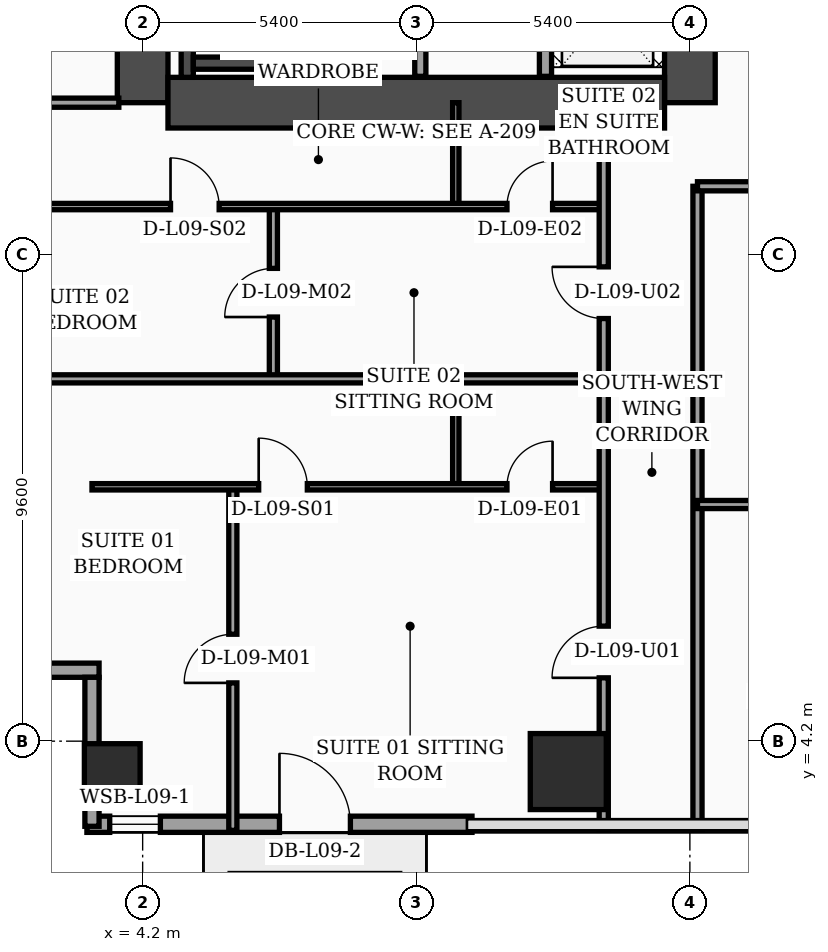
"""IFC4 building model, lengths in metres.
Left out: names, types, materials, properties, quantities, classifications, styles, units other than length and angle.
Written with IfcOpenShell. Run it as: python <this file> out.ifc"""

import sys

from ifc_helpers import new_model, si_unit, direction, frame, frame_2d, origin, origin_2d, place, context, subcontext, project, spatial, rectangle, hollow_rectangle, extrude, element, fill, save


model = new_model("IFC4")
c1 = context("Model", 3, precision=1e-05, world=origin(), true_north=direction((0.0, 1.0)))
c2 = subcontext(c1, "Body", "Model", "MODEL_VIEW")
j1 = project(units=[si_unit("LENGTHUNIT", "METRE"), si_unit("PLANEANGLEUNIT", "RADIAN")], contexts=[c1])
p1 = place(None, origin())
s1 = spatial("IfcSite", under=j1, at=p1, CompositionType="ELEMENT")
p2 = place(p1, origin())
s2 = spatial("IfcBuilding", under=s1, at=p2, CompositionType="ELEMENT")
p3 = place(p2, frame((0.0, 0.0, 42.2)))
s3 = spatial("IfcBuildingStorey", under=s2, at=p3, CompositionType="ELEMENT", Elevation=42.2)
p4 = place(p3, frame((4.2, 16.8, 0.0), z_axis=(0.0, 0.0, 1.0), x_axis=(0.0, 1.0, 0.0)))
e1 = element("IfcWall", 1, at=p4, inside=s3, PredefinedType="SHEAR", context=c2, shape_type="SweptSolid", body=[
    extrude(rectangle(XDim=21.6, YDim=1.0, at=frame_2d((10.8, 0.0))), origin(), (0.0, 0.0, 1.0), 3.52),
])
p5 = place(p3, frame((15.0, 16.8, 0.0), z_axis=(0.0, 0.0, 1.0), x_axis=(0.0, 1.0, 0.0)))
e2 = element("IfcWall", 2, at=p5, inside=s3, PredefinedType="SHEAR", context=c2, shape_type="SweptSolid", body=[
    extrude(rectangle(XDim=21.6, YDim=1.0, at=frame_2d((10.8, 0.0))), origin(), (0.0, 0.0, 1.0), 3.52),
])
p6 = place(p5, frame((8.65, 0.0, 0.0)))
e3 = element("IfcOpeningElement", 3, at=p6, cuts=e2, PredefinedType="OPENING", context=c2, shape_type="SweptSolid", body=[
    extrude(rectangle(XDim=1.1, YDim=2.2, at=frame_2d((0.55, 1.1))), frame((0.0, 0.51, 0.0), z_axis=(0.0, -1.0, 0.0), x_axis=(1.0, 0.0, 0.0)), (0.0, 0.0, 1.0), 1.02),
])
p7 = place(p5, frame((1.25, 0.0, 0.0)))
e4 = element("IfcOpeningElement", 4, at=p7, cuts=e2, PredefinedType="OPENING", context=c2, shape_type="SweptSolid", body=[
    extrude(rectangle(XDim=1.1, YDim=2.2, at=frame_2d((0.55, 1.1))), frame((0.0, 0.51, 0.0), z_axis=(0.0, -1.0, 0.0), x_axis=(1.0, 0.0, 0.0)), (0.0, 0.0, 1.0), 1.02),
])
p8 = place(p5, frame((3.8, 0.0, 0.0)))
e5 = element("IfcOpeningElement", 5, at=p8, cuts=e2, PredefinedType="OPENING", context=c2, shape_type="SweptSolid", body=[
    extrude(rectangle(XDim=1.1, YDim=2.2, at=frame_2d((0.55, 1.1))), frame((0.0, 0.51, 0.0), z_axis=(0.0, -1.0, 0.0), x_axis=(1.0, 0.0, 0.0)), (0.0, 0.0, 1.0), 1.02),
])
p9 = place(p5, frame((6.35, 0.0, 0.0)))
e6 = element("IfcOpeningElement", 6, at=p9, cuts=e2, PredefinedType="OPENING", context=c2, shape_type="SweptSolid", body=[
    extrude(rectangle(XDim=1.1, YDim=2.2, at=frame_2d((0.55, 1.1))), frame((0.0, 0.51, 0.0), z_axis=(0.0, -1.0, 0.0), x_axis=(1.0, 0.0, 0.0)), (0.0, 0.0, 1.0), 1.02),
])
p10 = place(p3, frame((4.7, 16.8, 0.0), z_axis=(0.0, 0.0, 1.0), x_axis=(1.0, 0.0, 0.0)))
e7 = element("IfcWall", 7, at=p10, inside=s3, PredefinedType="SHEAR", context=c2, shape_type="SweptSolid", body=[
    extrude(rectangle(XDim=9.8, YDim=1.0, at=frame_2d((4.9, 0.0))), origin(), (0.0, 0.0, 1.0), 3.52),
])
p11 = place(p3, frame((5.08, 17.3, 0.0), z_axis=(0.0, 0.0, 1.0), x_axis=(0.0, 1.0, 0.0)))
e8 = element("IfcWall", 8, at=p11, inside=s3, PredefinedType="SOLIDWALL", context=c2, shape_type="SweptSolid", body=[
    extrude(rectangle(XDim=9.49, YDim=0.24, at=frame_2d((4.745, 0.0))), origin(), (0.0, 0.0, 1.0), 3.52),
])
p12 = place(p3, frame((8.42, 17.3, 0.0), z_axis=(0.0, 0.0, 1.0), x_axis=(0.0, 1.0, 0.0)))
e9 = element("IfcWall", 9, at=p12, inside=s3, PredefinedType="SOLIDWALL", context=c2, shape_type="SweptSolid", body=[
    extrude(rectangle(XDim=9.49, YDim=0.24, at=frame_2d((4.745, 0.0))), origin(), (0.0, 0.0, 1.0), 3.52),
])
p13 = place(p12, frame((0.35, 0.0, 0.0)))
e10 = element("IfcOpeningElement", 10, at=p13, cuts=e9, PredefinedType="OPENING", context=c2, shape_type="SweptSolid", body=[
    extrude(rectangle(XDim=1.15, YDim=2.2, at=frame_2d((0.575, 1.1))), frame((0.0, 0.13, 0.0), z_axis=(0.0, -1.0, 0.0), x_axis=(1.0, 0.0, 0.0)), (0.0, 0.0, 1.0), 0.26),
])
p14 = place(p3, frame((5.2, 17.58, 0.0), z_axis=(0.0, 0.0, 1.0), x_axis=(1.0, 0.0, 0.0)))
e11 = element("IfcWall", 11, at=p14, inside=s3, PredefinedType="SOLIDWALL", context=c2, shape_type="SweptSolid", body=[
    extrude(rectangle(XDim=3.1, YDim=0.24, at=frame_2d((1.55, 0.0))), origin(), (0.0, 0.0, 1.0), 3.52),
])
p15 = place(p3, frame((3.6, 3.6, 0.0), z_axis=(0.0, 0.0, 1.0), x_axis=(1.0, 0.0, 0.0)))
e12 = element("IfcColumn", 12, at=p15, inside=s3, PredefinedType="COLUMN", context=c2, shape_type="SweptSolid", body=[
    extrude(hollow_rectangle(XDim=1.1, YDim=1.1, WallThickness=0.045, at=origin_2d()), origin(), (0.0, 0.0, 1.0), 3.52),
])
p16 = place(p3, frame((12.6, 3.6, 0.0), z_axis=(0.0, 0.0, 1.0), x_axis=(1.0, 0.0, 0.0)))
e13 = element("IfcColumn", 13, at=p16, inside=s3, PredefinedType="COLUMN", context=c2, shape_type="SweptSolid", body=[
    extrude(rectangle(XDim=1.5, YDim=1.5, at=origin_2d()), origin(), (0.0, 0.0, 1.0), 3.52),
])
p17 = place(p3, frame((3.1, 2.56, 0.0), z_axis=(0.0, 0.0, 1.0), x_axis=(1.0, 0.0, 0.0)))
e14 = element("IfcWall", 14, at=p17, inside=s3, PredefinedType="SOLIDWALL", context=c2, shape_type="SweptSolid", body=[
    extrude(rectangle(XDim=7.6, YDim=0.32, at=frame_2d((3.8, 0.0))), origin(), (0.0, 0.0, 1.0), 3.52),
])
p18 = place(p17, frame((0.45, 0.0, 0.75)))
e15 = element("IfcOpeningElement", 15, at=p18, cuts=e14, PredefinedType="OPENING", context=c2, shape_type="SweptSolid", body=[
    extrude(rectangle(XDim=1.0, YDim=1.6, at=frame_2d((0.5, 0.8))), frame((0.0, 0.17, 0.0), z_axis=(0.0, -1.0, 0.0), x_axis=(1.0, 0.0, 0.0)), (0.0, 0.0, 1.0), 0.34),
])
p19 = place(p17, frame((3.8, 0.0, 0.0)))
e16 = element("IfcOpeningElement", 16, at=p19, cuts=e14, PredefinedType="OPENING", context=c2, shape_type="SweptSolid", body=[
    extrude(rectangle(XDim=1.4, YDim=2.25, at=frame_2d((0.7, 1.125))), frame((0.0, 0.17, 0.0), z_axis=(0.0, -1.0, 0.0), x_axis=(1.0, 0.0, 0.0)), (0.0, 0.0, 1.0), 0.34),
])
p20 = place(p3, frame((0.12, 5.6, 0.0), z_axis=(0.0, 0.0, 1.0), x_axis=(1.0, 0.0, 0.0)))
e17 = element("IfcWall", 17, at=p20, inside=s3, PredefinedType="SOLIDWALL", context=c2, shape_type="SweptSolid", body=[
    extrude(rectangle(XDim=3.22, YDim=0.28, at=frame_2d((1.61, 0.0))), origin(), (0.0, 0.0, 1.0), 2.82),
])
p21 = place(p3, frame((3.2, 5.46, 0.0), z_axis=(0.0, 0.0, 1.0), x_axis=(0.0, -1.0, 0.0)))
e18 = element("IfcWall", 18, at=p21, inside=s3, PredefinedType="SOLIDWALL", context=c2, shape_type="SweptSolid", body=[
    extrude(rectangle(XDim=2.94, YDim=0.28, at=frame_2d((1.47, 0.0))), origin(), (0.0, 0.0, 1.0), 2.82),
])
p22 = place(p3, frame((9.68, 17.32, 0.0), z_axis=(0.0, 0.0, 1.0), x_axis=(0.0, 1.0, 0.0)))
e19 = element("IfcWall", 19, at=p22, inside=s3, PredefinedType="SOLIDWALL", context=c2, shape_type="SweptSolid", body=[
    extrude(rectangle(XDim=7.68, YDim=0.22, at=frame_2d((3.84, 0.0))), origin(), (0.0, 0.0, 1.0), 3.52),
])
p23 = place(p3, frame((12.15, 17.32, 0.0), z_axis=(0.0, 0.0, 1.0), x_axis=(0.0, 1.0, 0.0)))
e20 = element("IfcWall", 20, at=p23, inside=s3, PredefinedType="SOLIDWALL", context=c2, shape_type="SweptSolid", body=[
    extrude(rectangle(XDim=7.65, YDim=0.24, at=frame_2d((3.825, 0.0))), origin(), (0.0, 0.0, 1.0), 3.52),
])
p24 = place(p3, frame((0.08, 16.8, 0.0), z_axis=(0.0, 0.0, 1.0), x_axis=(1.0, 0.0, 0.0)))
e21 = element("IfcWall", 21, at=p24, inside=s3, PredefinedType="PARTITIONING", context=c2, shape_type="SweptSolid", body=[
    extrude(rectangle(XDim=3.65, YDim=0.18, at=frame_2d((1.825, 0.0))), origin(), (0.0, 0.0, 1.0), 2.82),
])
p25 = place(p3, frame((10.38, 9.22, 0.0), z_axis=(0.0, 0.0, 1.0), x_axis=(0.0, 1.0, 0.0)))
e22 = element("IfcWall", 22, at=p25, inside=s3, PredefinedType="PARTITIONING", context=c2, shape_type="SweptSolid", body=[
    extrude(rectangle(XDim=2.13, YDim=0.125, at=frame_2d((1.065, 0.0))), origin(), (0.0, 0.0, 1.0), 3.12),
])
p26 = place(p3, frame((5.98, 2.44, 0.0), z_axis=(0.0, 0.0, 1.0), x_axis=(0.0, 1.0, 0.0)))
e23 = element("IfcWall", 23, at=p26, inside=s3, PredefinedType="PARTITIONING", context=c2, shape_type="SweptSolid", body=[
    extrude(rectangle(XDim=6.78, YDim=0.16, at=frame_2d((3.39, 0.0))), origin(), (0.0, 0.0, 1.0), 3.02),
])
p27 = place(p26, frame((2.91, 0.0, 0.0)))
e24 = element("IfcOpeningElement", 24, at=p27, cuts=e23, PredefinedType="OPENING", context=c2, shape_type="SweptSolid", body=[
    extrude(rectangle(XDim=0.96, YDim=2.2, at=frame_2d((0.48, 1.1))), frame((0.0, 0.09, 0.0), z_axis=(0.0, -1.0, 0.0), x_axis=(1.0, 0.0, 0.0)), (0.0, 0.0, 1.0), 0.18),
])
p28 = place(p3, frame((3.2, 9.22, 0.0), z_axis=(0.0, 0.0, 1.0), x_axis=(1.0, 0.0, 0.0)))
e25 = element("IfcWall", 25, at=p28, inside=s3, PredefinedType="PARTITIONING", context=c2, shape_type="SweptSolid", body=[
    extrude(rectangle(XDim=10.1, YDim=0.125, at=frame_2d((5.05, 0.0))), origin(), (0.0, 0.0, 1.0), 2.82),
])
p29 = place(p28, frame((3.29, 0.0, 0.0)))
e26 = element("IfcOpeningElement", 26, at=p29, cuts=e25, PredefinedType="OPENING", context=c2, shape_type="SweptSolid", body=[
    extrude(rectangle(XDim=0.96, YDim=2.2, at=frame_2d((0.48, 1.1))), frame((0.0, 0.073, 0.0), z_axis=(0.0, -1.0, 0.0), x_axis=(1.0, 0.0, 0.0)), (0.0, 0.0, 1.0), 0.145),
])
p30 = place(p28, frame((8.19, 0.0, 0.0)))
e27 = element("IfcOpeningElement", 27, at=p30, cuts=e25, PredefinedType="OPENING", context=c2, shape_type="SweptSolid", body=[
    extrude(rectangle(XDim=0.9, YDim=2.15, at=frame_2d((0.45, 1.075))), frame((0.0, 0.073, 0.0), z_axis=(0.0, -1.0, 0.0), x_axis=(1.0, 0.0, 0.0)), (0.0, 0.0, 1.0), 0.145),
])
p31 = place(p3, frame((10.38, 14.75, 0.0), z_axis=(0.0, 0.0, 1.0), x_axis=(0.0, 1.0, 0.0)))
e28 = element("IfcWall", 28, at=p31, inside=s3, PredefinedType="PARTITIONING", context=c2, shape_type="SweptSolid", body=[
    extrude(rectangle(XDim=2.05, YDim=0.125, at=frame_2d((1.025, 0.0))), origin(), (0.0, 0.0, 1.0), 3.52),
])
p32 = place(p3, frame((6.78, 11.35, 0.0), z_axis=(0.0, 0.0, 1.0), x_axis=(0.0, 1.0, 0.0)))
e29 = element("IfcWall", 29, at=p32, inside=s3, PredefinedType="PARTITIONING", context=c2, shape_type="SweptSolid", body=[
    extrude(rectangle(XDim=3.4, YDim=0.16, at=frame_2d((1.7, 0.0))), origin(), (0.0, 0.0, 1.0), 3.52),
])
p33 = place(p32, frame((1.22, 0.0, 0.0)))
e30 = element("IfcOpeningElement", 30, at=p33, cuts=e29, PredefinedType="OPENING", context=c2, shape_type="SweptSolid", body=[
    extrude(rectangle(XDim=0.96, YDim=2.2, at=frame_2d((0.48, 1.1))), frame((0.0, 0.09, 0.0), z_axis=(0.0, -1.0, 0.0), x_axis=(1.0, 0.0, 0.0)), (0.0, 0.0, 1.0), 0.18),
])
p34 = place(p3, frame((0.08, 14.75, 0.0), z_axis=(0.0, 0.0, 1.0), x_axis=(1.0, 0.0, 0.0)))
e31 = element("IfcWall", 31, at=p34, inside=s3, PredefinedType="PARTITIONING", context=c2, shape_type="SweptSolid", body=[
    extrude(rectangle(XDim=13.22, YDim=0.125, at=frame_2d((6.61, 0.0))), origin(), (0.0, 0.0, 1.0), 2.82),
])
p35 = place(p34, frame((4.67, 0.0, 0.0)))
e32 = element("IfcOpeningElement", 32, at=p35, cuts=e31, PredefinedType="OPENING", context=c2, shape_type="SweptSolid", body=[
    extrude(rectangle(XDim=0.96, YDim=2.2, at=frame_2d((0.48, 1.1))), frame((0.0, 0.073, 0.0), z_axis=(0.0, -1.0, 0.0), x_axis=(1.0, 0.0, 0.0)), (0.0, 0.0, 1.0), 0.145),
])
p36 = place(p34, frame((11.31, 0.0, 0.0)))
e33 = element("IfcOpeningElement", 33, at=p36, cuts=e31, PredefinedType="OPENING", context=c2, shape_type="SweptSolid", body=[
    extrude(rectangle(XDim=0.9, YDim=2.15, at=frame_2d((0.45, 1.075))), frame((0.0, 0.073, 0.0), z_axis=(0.0, -1.0, 0.0), x_axis=(1.0, 0.0, 0.0)), (0.0, 0.0, 1.0), 0.145),
])
p37 = place(p3, frame((0.08, 11.35, 0.0), z_axis=(0.0, 0.0, 1.0), x_axis=(1.0, 0.0, 0.0)))
e34 = element("IfcWall", 34, at=p37, inside=s3, PredefinedType="PARTITIONING", context=c2, shape_type="SweptSolid", body=[
    extrude(rectangle(XDim=13.22, YDim=0.16, at=frame_2d((6.61, 0.0))), origin(), (0.0, 0.0, 1.0), 2.82),
])
p38 = place(p3, frame((13.3, 2.44, 0.0), z_axis=(0.0, 0.0, 1.0), x_axis=(0.0, 1.0, 0.0)))
e35 = element("IfcWall", 35, at=p38, inside=s3, PredefinedType="PARTITIONING", context=c2, shape_type="SweptSolid", body=[
    extrude(rectangle(XDim=14.36, YDim=0.18, at=frame_2d((7.18, 0.0))), origin(), (0.0, 0.0, 1.0), 3.02),
])
p39 = place(p38, frame((3.01, 0.0, 0.0)))
e36 = element("IfcOpeningElement", 36, at=p39, cuts=e35, PredefinedType="OPENING", context=c2, shape_type="SweptSolid", body=[
    extrude(rectangle(XDim=1.02, YDim=2.2, at=frame_2d((0.51, 1.1))), frame((0.0, 0.1, 0.0), z_axis=(0.0, -1.0, 0.0), x_axis=(1.0, 0.0, 0.0)), (0.0, 0.0, 1.0), 0.2),
])
p40 = place(p38, frame((10.1, 0.0, 0.0)))
e37 = element("IfcOpeningElement", 37, at=p40, cuts=e35, PredefinedType="OPENING", context=c2, shape_type="SweptSolid", body=[
    extrude(rectangle(XDim=1.02, YDim=2.2, at=frame_2d((0.51, 1.1))), frame((0.0, 0.1, 0.0), z_axis=(0.0, -1.0, 0.0), x_axis=(1.0, 0.0, 0.0)), (0.0, 0.0, 1.0), 0.2),
])
p41 = place(p3, frame((15.15, 2.44, 0.0), z_axis=(0.0, 0.0, 1.0), x_axis=(0.0, 1.0, 0.0)))
e38 = element("IfcWall", 38, at=p41, inside=s3, PredefinedType="PARTITIONING", context=c2, shape_type="SweptSolid", body=[
    extrude(rectangle(XDim=12.71, YDim=0.18, at=frame_2d((6.355, 0.0))), origin(), (0.0, 0.0, 1.0), 3.02),
])
p42 = place(p3, frame((15.15, 8.87, 0.0), z_axis=(0.0, 0.0, 1.0), x_axis=(1.0, 0.0, 0.0)))
e39 = element("IfcWall", 39, at=p42, inside=s3, PredefinedType="PARTITIONING", context=c2, shape_type="SweptSolid", body=[
    extrude(rectangle(XDim=4.45, YDim=0.16, at=frame_2d((2.225, 0.0))), origin(), (0.0, 0.0, 1.0), 3.52),
])
p43 = place(p42, frame((1.75, 0.0, 0.0)))
e40 = element("IfcOpeningElement", 40, at=p43, cuts=e39, PredefinedType="OPENING", context=c2, shape_type="SweptSolid", body=[
    extrude(rectangle(XDim=0.96, YDim=2.2, at=frame_2d((0.48, 1.1))), frame((0.0, 0.09, 0.0), z_axis=(0.0, -1.0, 0.0), x_axis=(1.0, 0.0, 0.0)), (0.0, 0.0, 1.0), 0.18),
])
p44 = place(p3, frame((15.15, 15.15, 0.0), z_axis=(0.0, 0.0, 1.0), x_axis=(1.0, 0.0, 0.0)))
e41 = element("IfcWall", 41, at=p44, inside=s3, PredefinedType="PARTITIONING", context=c2, shape_type="SweptSolid", body=[
    extrude(rectangle(XDim=6.45, YDim=0.18, at=frame_2d((3.225, 0.0))), origin(), (0.0, 0.0, 1.0), 2.32),
])
p45 = place(p44, frame((1.74, 0.0, 0.0)))
e42 = element("IfcOpeningElement", 42, at=p45, cuts=e41, PredefinedType="OPENING", context=c2, shape_type="SweptSolid", body=[
    extrude(rectangle(XDim=1.02, YDim=2.2, at=frame_2d((0.51, 1.1))), frame((0.0, 0.1, 0.0), z_axis=(0.0, -1.0, 0.0), x_axis=(1.0, 0.0, 0.0)), (0.0, 0.0, 1.0), 0.2),
])
p46 = place(p18, origin())
e43 = element("IfcWindow", 43, at=p46, inside=s3, PartitioningType="SINGLE_PANEL", PredefinedType="WINDOW", context=c2, shape_type="SweptSolid", body=[
    extrude(rectangle(XDim=1.0, YDim=1.6, at=frame_2d((0.5, 0.8))), frame((0.0, 0.03, 0.0), z_axis=(0.0, -1.0, 0.0), x_axis=(1.0, 0.0, 0.0)), (0.0, 0.0, 1.0), 0.06),
])
fill(e15, e43)
p47 = place(p19, origin())
e44 = element("IfcDoor", 44, at=p47, inside=s3, OperationType="SINGLE_SWING_LEFT", PredefinedType="DOOR", context=c2, shape_type="SweptSolid", body=[
    extrude(rectangle(XDim=1.4, YDim=2.25, at=frame_2d((0.7, 1.125))), frame((0.0, 0.025, 0.0), z_axis=(0.0, -1.0, 0.0), x_axis=(1.0, 0.0, 0.0)), (0.0, 0.0, 1.0), 0.05),
])
fill(e16, e44)
p48 = place(p27, origin())
e45 = element("IfcDoor", 45, at=p48, inside=s3, OperationType="SINGLE_SWING_LEFT", PredefinedType="DOOR", context=c2, shape_type="SweptSolid", body=[
    extrude(rectangle(XDim=0.96, YDim=2.2, at=frame_2d((0.48, 1.1))), frame((0.0, 0.025, 0.0), z_axis=(0.0, -1.0, 0.0), x_axis=(1.0, 0.0, 0.0)), (0.0, 0.0, 1.0), 0.05),
])
fill(e24, e45)
p49 = place(p29, origin())
e46 = element("IfcDoor", 46, at=p49, inside=s3, OperationType="SINGLE_SWING_LEFT", PredefinedType="DOOR", context=c2, shape_type="SweptSolid", body=[
    extrude(rectangle(XDim=0.96, YDim=2.2, at=frame_2d((0.48, 1.1))), frame((0.0, 0.025, 0.0), z_axis=(0.0, -1.0, 0.0), x_axis=(1.0, 0.0, 0.0)), (0.0, 0.0, 1.0), 0.05),
])
fill(e26, e46)
p50 = place(p30, origin())
e47 = element("IfcDoor", 47, at=p50, inside=s3, OperationType="SINGLE_SWING_RIGHT", PredefinedType="DOOR", context=c2, shape_type="SweptSolid", body=[
    extrude(rectangle(XDim=0.9, YDim=2.15, at=frame_2d((0.45, 1.075))), frame((0.0, 0.025, 0.0), z_axis=(0.0, -1.0, 0.0), x_axis=(1.0, 0.0, 0.0)), (0.0, 0.0, 1.0), 0.05),
])
fill(e27, e47)
p51 = place(p33, origin())
e48 = element("IfcDoor", 48, at=p51, inside=s3, OperationType="SINGLE_SWING_LEFT", PredefinedType="DOOR", context=c2, shape_type="SweptSolid", body=[
    extrude(rectangle(XDim=0.96, YDim=2.2, at=frame_2d((0.48, 1.1))), frame((0.0, 0.025, 0.0), z_axis=(0.0, -1.0, 0.0), x_axis=(1.0, 0.0, 0.0)), (0.0, 0.0, 1.0), 0.05),
])
fill(e30, e48)
p52 = place(p35, origin())
e49 = element("IfcDoor", 49, at=p52, inside=s3, OperationType="SINGLE_SWING_LEFT", PredefinedType="DOOR", context=c2, shape_type="SweptSolid", body=[
    extrude(rectangle(XDim=0.96, YDim=2.2, at=frame_2d((0.48, 1.1))), frame((0.0, 0.025, 0.0), z_axis=(0.0, -1.0, 0.0), x_axis=(1.0, 0.0, 0.0)), (0.0, 0.0, 1.0), 0.05),
])
fill(e32, e49)
p53 = place(p36, origin())
e50 = element("IfcDoor", 50, at=p53, inside=s3, OperationType="SINGLE_SWING_RIGHT", PredefinedType="DOOR", context=c2, shape_type="SweptSolid", body=[
    extrude(rectangle(XDim=0.9, YDim=2.15, at=frame_2d((0.45, 1.075))), frame((0.0, 0.025, 0.0), z_axis=(0.0, -1.0, 0.0), x_axis=(1.0, 0.0, 0.0)), (0.0, 0.0, 1.0), 0.05),
])
fill(e33, e50)
p54 = place(p39, origin())
e51 = element("IfcDoor", 51, at=p54, inside=s3, OperationType="SINGLE_SWING_LEFT", PredefinedType="DOOR", context=c2, shape_type="SweptSolid", body=[
    extrude(rectangle(XDim=1.02, YDim=2.2, at=frame_2d((0.51, 1.1))), frame((0.0, 0.025, 0.0), z_axis=(0.0, -1.0, 0.0), x_axis=(1.0, 0.0, 0.0)), (0.0, 0.0, 1.0), 0.05),
])
fill(e36, e51)
p55 = place(p40, origin())
e52 = element("IfcDoor", 52, at=p55, inside=s3, OperationType="SINGLE_SWING_RIGHT", PredefinedType="DOOR", context=c2, shape_type="SweptSolid", body=[
    extrude(rectangle(XDim=1.02, YDim=2.2, at=frame_2d((0.51, 1.1))), frame((0.0, 0.025, 0.0), z_axis=(0.0, -1.0, 0.0), x_axis=(1.0, 0.0, 0.0)), (0.0, 0.0, 1.0), 0.05),
])
fill(e37, e52)
p56 = place(p13, origin())
e53 = element("IfcDoor", 53, at=p56, inside=s3, OperationType="SINGLE_SWING_LEFT", PredefinedType="DOOR", context=c2, shape_type="SweptSolid", body=[
    extrude(rectangle(XDim=1.15, YDim=2.2, at=frame_2d((0.575, 1.1))), frame((0.0, 0.025, 0.0), z_axis=(0.0, -1.0, 0.0), x_axis=(1.0, 0.0, 0.0)), (0.0, 0.0, 1.0), 0.05),
])
fill(e10, e53)
save(model, sys.argv[1])
